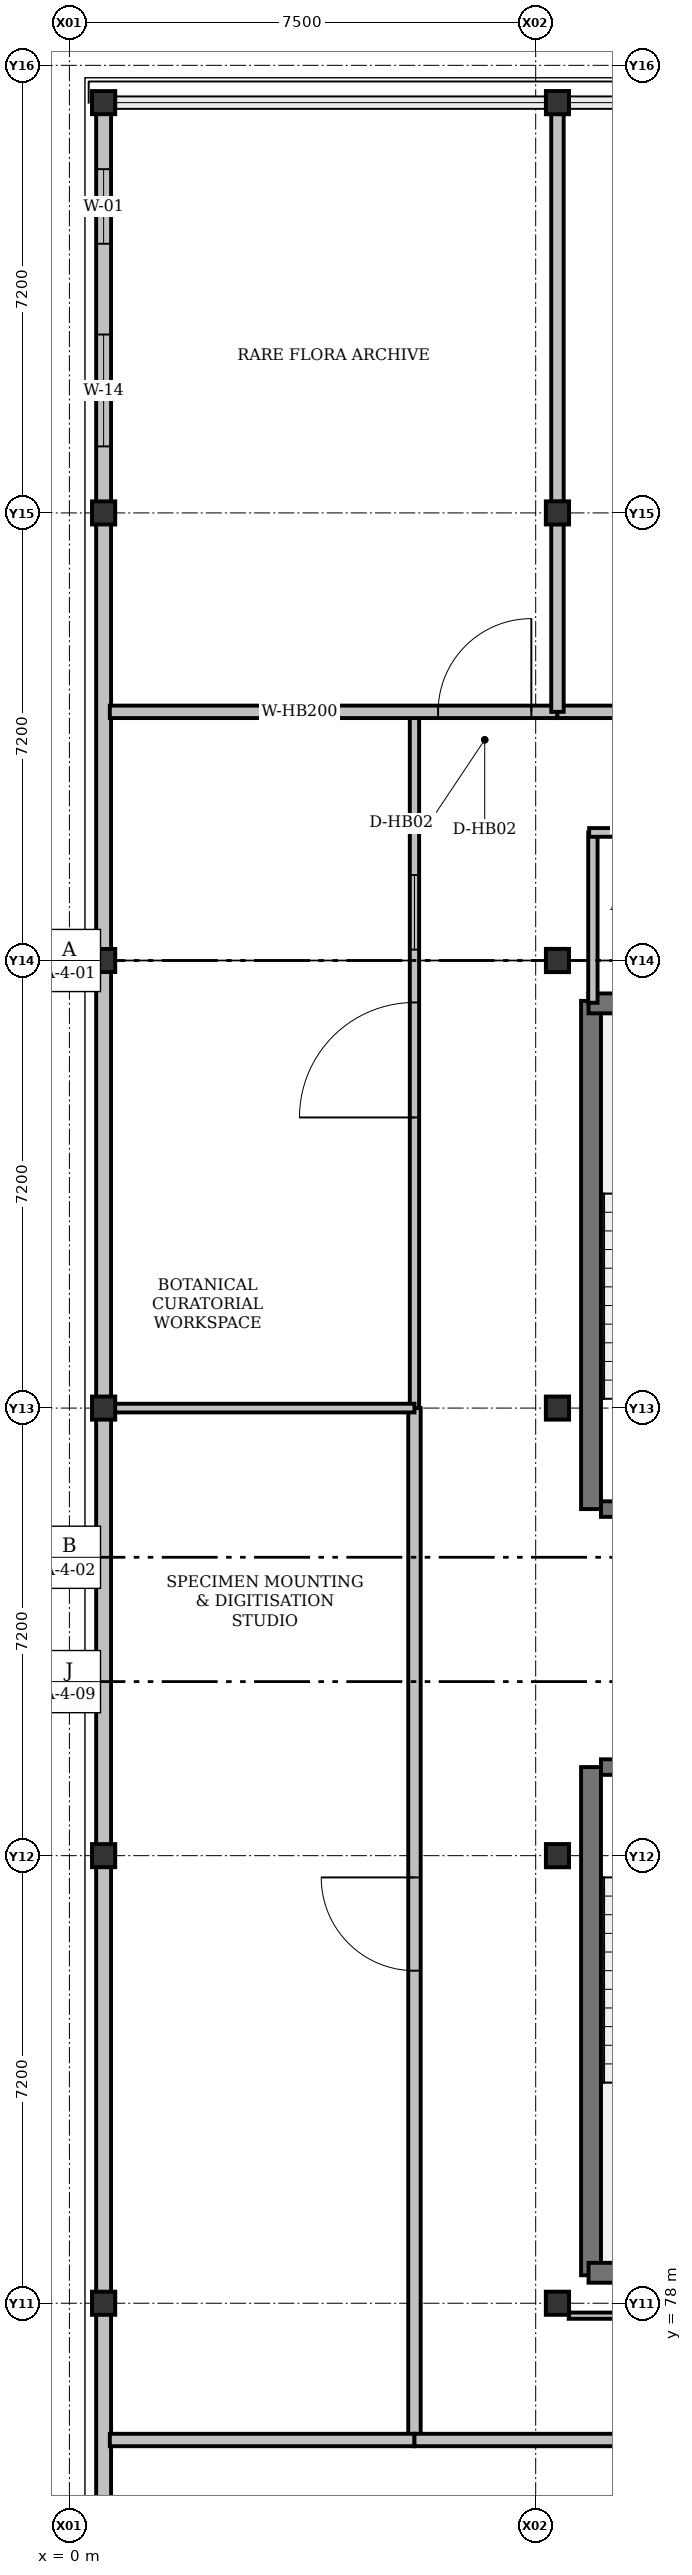
"""IFC4 building model, lengths in metres.
Left out: names, types, materials, properties, quantities, classifications, styles, units other than length and angle.
Written with IfcOpenShell. Run it as: python <this file> out.ifc"""

import sys

from ifc_helpers import new_model, si_unit, direction, frame, frame_2d, origin, origin_2d, place, context, subcontext, project, spatial, rectangle, i_section, extrude, element, fill, save


model = new_model("IFC4")
c1 = context("Model", 3, precision=1e-05, world=origin(), true_north=direction((0.0, 1.0)))
c2 = subcontext(c1, "Body", "Model", "MODEL_VIEW")
j1 = project(units=[si_unit("LENGTHUNIT", "METRE"), si_unit("PLANEANGLEUNIT", "RADIAN")], contexts=[c1])
p1 = place(None, origin())
s1 = spatial("IfcSite", under=j1, at=p1, CompositionType="ELEMENT")
p2 = place(p1, origin())
s2 = spatial("IfcBuilding", under=s1, at=p2, CompositionType="ELEMENT")
p3 = place(p2, frame((0.0, 0.0, 30.9)))
s3 = spatial("IfcBuildingStorey", under=s2, at=p3, CompositionType="ELEMENT", Elevation=30.9)
for number, where, z_axis, x_axis in (
    (1, (0.55, 78.0, 0.0), (0.0, 0.0, 1.0), (1.0, 0.0, 0.0)),
    (2, (7.85, 78.0, 0.0), (0.0, 0.0, 1.0), (1.0, 0.0, 0.0)),
    (3, (0.55, 85.2, 0.0), (0.0, 0.0, 1.0), (1.0, 0.0, 0.0)),
    (4, (7.85, 85.2, 0.0), (0.0, 0.0, 1.0), (0.0, 1.0, 0.0)),
    (5, (0.55, 92.4, 0.0), (0.0, 0.0, 1.0), (1.0, 0.0, 0.0)),
    (6, (7.85, 92.4, 0.0), (0.0, 0.0, 1.0), (1.0, 0.0, 0.0)),
    (7, (0.55, 99.6, 0.0), (0.0, 0.0, 1.0), (1.0, 0.0, 0.0)),
    (8, (7.85, 99.6, 0.0), (0.0, 0.0, 1.0), (0.0, 1.0, 0.0)),
    (9, (0.55, 106.8, 0.0), (0.0, 0.0, 1.0), (1.0, 0.0, 0.0)),
    (10, (7.85, 106.8, 0.0), (0.0, 0.0, 1.0), (1.0, 0.0, 0.0)),
    (11, (0.55, 113.4, 0.0), (0.0, 0.0, 1.0), (1.0, 0.0, 0.0)),
    (12, (7.85, 113.4, 0.0), (0.0, 0.0, 1.0), (0.0, 1.0, 0.0)),
):
    element("IfcColumn", number, at=place(p3, frame(where, z_axis=z_axis, x_axis=x_axis)), inside=s3, PredefinedType="COLUMN", context=c2, shape_type="SweptSolid", body=[
        extrude(i_section(OverallWidth=0.374, OverallDepth=0.372, WebThickness=0.016, FlangeThickness=0.026, FilletRadius=0.015, at=origin_2d()), origin(), (0.0, 0.0, 1.0), 4.2),
    ])
p4 = place(p3, frame((0.55, 70.5, 0.0), z_axis=(0.0, 0.0, 1.0), x_axis=(0.0, 1.0, 0.0)))
e13 = element("IfcWall", 13, at=p4, inside=s3, PredefinedType="SOLIDWALL", context=c2, shape_type="SweptSolid", body=[
    extrude(rectangle(XDim=7.5, YDim=0.24, at=frame_2d((3.75, 0.0))), origin(), (0.0, 0.0, 1.0), 3.562),
])
for number, where, z_axis, x_axis in (
    (14, (0.55, 78.0, 0.0), (0.0, 0.0, 1.0), (0.0, 1.0, 0.0)),
    (15, (0.55, 85.2, 0.0), (0.0, 0.0, 1.0), (0.0, 1.0, 0.0)),
):
    element("IfcWall", number, at=place(p3, frame(where, z_axis=z_axis, x_axis=x_axis)), inside=s3, PredefinedType="SOLIDWALL", context=c2, shape_type="SweptSolid", body=[
        extrude(rectangle(XDim=7.2, YDim=0.24, at=frame_2d((3.6, 0.0))), origin(), (0.0, 0.0, 1.0), 3.562),
    ])
p5 = place(p3, frame((0.55, 92.4, 0.0), z_axis=(0.0, 0.0, 1.0), x_axis=(0.0, 1.0, 0.0)))
e16 = element("IfcWall", 16, at=p5, inside=s3, PredefinedType="SOLIDWALL", context=c2, shape_type="SweptSolid", body=[
    extrude(rectangle(XDim=7.2, YDim=0.24, at=frame_2d((3.6, 0.0))), origin(), (0.0, 0.0, 1.0), 3.562),
])
p6 = place(p3, frame((0.55, 99.6, 0.0), z_axis=(0.0, 0.0, 1.0), x_axis=(0.0, 1.0, 0.0)))
e17 = element("IfcWall", 17, at=p6, inside=s3, PredefinedType="SOLIDWALL", context=c2, shape_type="SweptSolid", body=[
    extrude(rectangle(XDim=7.2, YDim=0.24, at=frame_2d((3.6, 0.0))), origin(), (0.0, 0.0, 1.0), 3.562),
])
p7 = place(p3, frame((0.55, 106.8, 0.0), z_axis=(0.0, 0.0, 1.0), x_axis=(0.0, 1.0, 0.0)))
e18 = element("IfcWall", 18, at=p7, inside=s3, PredefinedType="SOLIDWALL", context=c2, shape_type="SweptSolid", body=[
    extrude(rectangle(XDim=6.6, YDim=0.24, at=frame_2d((3.3, 0.0))), origin(), (0.0, 0.0, 1.0), 3.562),
])
p8 = place(p7, frame((1.07, 0.0, 0.92)))
e19 = element("IfcOpeningElement", 19, at=p8, cuts=e18, PredefinedType="OPENING", context=c2, shape_type="SweptSolid", body=[
    extrude(rectangle(XDim=1.8, YDim=1.7, at=frame_2d((0.9, 0.85))), frame((0.0, 0.12, 0.0), z_axis=(0.0, -1.0, 0.0), x_axis=(1.0, 0.0, 0.0)), (0.0, 0.0, 1.0), 0.24),
])
p9 = place(p7, frame((4.33, 0.0, 0.92)))
e20 = element("IfcOpeningElement", 20, at=p9, cuts=e18, PredefinedType="OPENING", context=c2, shape_type="SweptSolid", body=[
    extrude(rectangle(XDim=1.2, YDim=1.4, at=frame_2d((0.6, 0.7))), frame((0.0, 0.12, 0.0), z_axis=(0.0, -1.0, 0.0), x_axis=(1.0, 0.0, 0.0)), (0.0, 0.0, 1.0), 0.24),
])
for number, where, z_axis, x_axis in (
    (21, (8.39, 78.45, 0.0), (0.0, 0.0, 1.0), (0.0, 1.0, 0.0)),
    (22, (8.39, 90.775, 0.0), (0.0, 0.0, 1.0), (0.0, 1.0, 0.0)),
):
    element("IfcWall", number, at=place(p3, frame(where, z_axis=z_axis, x_axis=x_axis)), inside=s3, PredefinedType="SHEAR", context=c2, shape_type="SweptSolid", body=[
        extrude(rectangle(XDim=8.175, YDim=0.32, at=frame_2d((4.087, 0.0))), origin(), (0.0, 0.0, 1.0), 4.2),
    ])
for number, where, z_axis, x_axis in (
    (23, (8.35, 78.49, 0.0), (0.0, 0.0, 1.0), (1.0, 0.0, 0.0)),
    (24, (8.35, 98.91, 0.0), (0.0, 0.0, 1.0), (1.0, 0.0, 0.0)),
):
    element("IfcWall", number, at=place(p3, frame(where, z_axis=z_axis, x_axis=x_axis)), inside=s3, PredefinedType="SHEAR", context=c2, shape_type="SweptSolid", body=[
        extrude(rectangle(XDim=3.77, YDim=0.32, at=frame_2d((1.885, 0.0))), origin(), (0.0, 0.0, 1.0), 4.2),
    ])
p10 = place(p3, frame((8.55, 86.625, 0.0), z_axis=(0.0, 0.0, 1.0), x_axis=(1.0, 0.0, 0.0)))
e25 = element("IfcWall", 25, at=p10, inside=s3, PredefinedType="SHEAR", context=c2, shape_type="SweptSolid", body=[
    extrude(rectangle(XDim=3.32, YDim=0.25, at=frame_2d((1.66, 0.0))), origin(), (0.0, 0.0, 1.0), 4.2),
])
p11 = place(p10, frame((1.75, 0.0, 0.0)))
e26 = element("IfcOpeningElement", 26, at=p11, cuts=e25, PredefinedType="OPENING", context=c2, shape_type="SweptSolid", body=[
    extrude(rectangle(XDim=1.1, YDim=2.15, at=frame_2d((0.55, 1.075))), frame((0.0, 0.125, 0.0), z_axis=(0.0, -1.0, 0.0), x_axis=(1.0, 0.0, 0.0)), (0.0, 0.0, 1.0), 0.25),
])
p12 = place(p3, frame((11.87, 90.775, 0.0), z_axis=(0.0, 0.0, 1.0), x_axis=(-1.0, 0.0, 0.0)))
e27 = element("IfcWall", 27, at=p12, inside=s3, PredefinedType="SHEAR", context=c2, shape_type="SweptSolid", body=[
    extrude(rectangle(XDim=3.32, YDim=0.25, at=frame_2d((1.66, 0.0))), origin(), (0.0, 0.0, 1.0), 4.2),
])
p13 = place(p12, frame((0.45, 0.0, 0.0)))
e28 = element("IfcOpeningElement", 28, at=p13, cuts=e27, PredefinedType="OPENING", context=c2, shape_type="SweptSolid", body=[
    extrude(rectangle(XDim=1.15, YDim=2.15, at=frame_2d((0.575, 1.075))), frame((0.0, 0.125, 0.0), z_axis=(0.0, -1.0, 0.0), x_axis=(1.0, 0.0, 0.0)), (0.0, 0.0, 1.0), 0.25),
])
p14 = place(p3, frame((8.42, 98.92, 0.0), z_axis=(0.0, 0.0, 1.0), x_axis=(0.0, 1.0, 0.0)))
e29 = element("IfcWall", 29, at=p14, inside=s3, PredefinedType="PARTITIONING", context=c2, shape_type="SweptSolid", body=[
    extrude(rectangle(XDim=2.74, YDim=0.15, at=frame_2d((1.37, 0.0))), origin(), (0.0, 0.0, 1.0), 3.436),
])
p15 = place(p3, frame((8.36, 101.66, 0.0), z_axis=(0.0, 0.0, 1.0), x_axis=(1.0, 0.0, 0.0)))
e30 = element("IfcWall", 30, at=p15, inside=s3, PredefinedType="PARTITIONING", context=c2, shape_type="SweptSolid", body=[
    extrude(rectangle(XDim=3.7, YDim=0.14, at=frame_2d((1.85, 0.0))), origin(), (0.0, 0.0, 1.0), 3.95),
])
p16 = place(p3, frame((8.032, 77.8, 0.0), z_axis=(0.0, 0.0, 1.0), x_axis=(1.0, 0.0, 0.0)))
e31 = element("IfcWall", 31, at=p16, inside=s3, PredefinedType="PARTITIONING", context=c2, shape_type="SweptSolid", body=[
    extrude(rectangle(XDim=3.968, YDim=0.1, at=frame_2d((1.984, 0.0))), origin(), (0.0, 0.0, 1.0), 3.436),
])
p17 = place(p3, frame((5.55, 75.8, 0.0), z_axis=(0.0, 0.0, 1.0), x_axis=(0.0, 1.0, 0.0)))
e32 = element("IfcWall", 32, at=p17, inside=s3, PredefinedType="SOLIDWALL", context=c2, shape_type="SweptSolid", body=[
    extrude(rectangle(XDim=16.6, YDim=0.2, at=frame_2d((8.3, 0.0))), origin(), (0.0, 0.0, 1.0), 3.436),
])
p18 = place(p17, frame((7.55, 0.0, 0.0)))
e33 = element("IfcOpeningElement", 33, at=p18, cuts=e32, PredefinedType="OPENING", context=c2, shape_type="SweptSolid", body=[
    extrude(rectangle(XDim=1.5, YDim=2.3, at=frame_2d((0.75, 1.15))), frame((0.0, 0.1, 0.0), z_axis=(0.0, -1.0, 0.0), x_axis=(1.0, 0.0, 0.0)), (0.0, 0.0, 1.0), 0.2),
])
p19 = place(p3, frame((5.55, 92.4, 0.0), z_axis=(0.0, 0.0, 1.0), x_axis=(0.0, 1.0, 0.0)))
e34 = element("IfcWall", 34, at=p19, inside=s3, PredefinedType="PARTITIONING", context=c2, shape_type="SweptSolid", body=[
    extrude(rectangle(XDim=11.2, YDim=0.15, at=frame_2d((5.6, 0.0))), origin(), (0.0, 0.0, 1.0), 3.436),
])
p20 = place(p19, frame((4.675, 0.0, 0.0)))
e35 = element("IfcOpeningElement", 35, at=p20, cuts=e34, PredefinedType="OPENING", context=c2, shape_type="SweptSolid", body=[
    extrude(rectangle(XDim=1.85, YDim=2.35, at=frame_2d((0.925, 1.175))), frame((0.0, 0.075, 0.0), z_axis=(0.0, -1.0, 0.0), x_axis=(1.0, 0.0, 0.0)), (0.0, 0.0, 1.0), 0.15),
])
p21 = place(p19, frame((7.375, 0.0, 0.92)))
e36 = element("IfcOpeningElement", 36, at=p21, cuts=e34, PredefinedType="OPENING", context=c2, shape_type="SweptSolid", body=[
    extrude(rectangle(XDim=1.2, YDim=1.2, at=frame_2d((0.6, 0.6))), frame((0.0, 0.075, 0.0), z_axis=(0.0, -1.0, 0.0), x_axis=(1.0, 0.0, 0.0)), (0.0, 0.0, 1.0), 0.15),
])
p22 = place(p3, frame((0.65, 92.4, 0.0), z_axis=(0.0, 0.0, 1.0), x_axis=(1.0, 0.0, 0.0)))
e37 = element("IfcWall", 37, at=p22, inside=s3, PredefinedType="PARTITIONING", context=c2, shape_type="SweptSolid", body=[
    extrude(rectangle(XDim=4.9, YDim=0.14, at=frame_2d((2.45, 0.0))), origin(), (0.0, 0.0, 1.0), 3.436),
])
p23 = place(p3, frame((0.65, 103.6, 0.0), z_axis=(0.0, 0.0, 1.0), x_axis=(1.0, 0.0, 0.0)))
e38 = element("IfcWall", 38, at=p23, inside=s3, PredefinedType="SOLIDWALL", context=c2, shape_type="SweptSolid", body=[
    extrude(rectangle(XDim=7.2, YDim=0.2, at=frame_2d((3.6, 0.0))), origin(), (0.0, 0.0, 1.0), 3.512),
])
p24 = place(p23, frame((5.28, 0.0, 0.0)))
e39 = element("IfcOpeningElement", 39, at=p24, cuts=e38, PredefinedType="OPENING", context=c2, shape_type="SweptSolid", body=[
    extrude(rectangle(XDim=1.5, YDim=2.3, at=frame_2d((0.75, 1.15))), frame((0.0, 0.1, 0.0), z_axis=(0.0, -1.0, 0.0), x_axis=(1.0, 0.0, 0.0)), (0.0, 0.0, 1.0), 0.2),
])
p25 = place(p3, frame((7.85, 103.6, 0.0), z_axis=(0.0, 0.0, 1.0), x_axis=(1.0, 0.0, 0.0)))
e40 = element("IfcWall", 40, at=p25, inside=s3, PredefinedType="SOLIDWALL", context=c2, shape_type="SweptSolid", body=[
    extrude(rectangle(XDim=19.69, YDim=0.2, at=frame_2d((9.845, 0.0))), origin(), (0.0, 0.0, 1.0), 3.512),
])
p26 = place(p25, frame((2.075, 0.0, 0.0)))
e41 = element("IfcOpeningElement", 41, at=p26, cuts=e40, PredefinedType="OPENING", context=c2, shape_type="SweptSolid", body=[
    extrude(rectangle(XDim=1.35, YDim=2.25, at=frame_2d((0.675, 1.125))), frame((0.0, 0.1, 0.0), z_axis=(0.0, -1.0, 0.0), x_axis=(1.0, 0.0, 0.0)), (0.0, 0.0, 1.0), 0.2),
])
p27 = place(p3, frame((7.85, 106.619, 0.0), z_axis=(0.0, 0.0, 1.0), x_axis=(0.0, -1.0, 0.0)))
e42 = element("IfcWall", 42, at=p27, inside=s3, PredefinedType="SOLIDWALL", context=c2, shape_type="SweptSolid", body=[
    extrude(rectangle(XDim=3.019, YDim=0.2, at=frame_2d((1.509, 0.0))), origin(), (0.0, 0.0, 1.0), 3.512),
])
p28 = place(p3, frame((7.85, 113.35, 0.0), z_axis=(0.0, 0.0, 1.0), x_axis=(0.0, -1.0, 0.0)))
e43 = element("IfcWall", 43, at=p28, inside=s3, PredefinedType="SOLIDWALL", context=c2, shape_type="SweptSolid", body=[
    extrude(rectangle(XDim=6.369, YDim=0.2, at=frame_2d((3.185, 0.0))), origin(), (0.0, 0.0, 1.0), 3.512),
])
p29 = place(p3, frame((0.65, 75.8, 0.0), z_axis=(0.0, 0.0, 1.0), x_axis=(1.0, 0.0, 0.0)))
e44 = element("IfcWall", 44, at=p29, inside=s3, PredefinedType="SOLIDWALL", context=c2, shape_type="SweptSolid", body=[
    extrude(rectangle(XDim=4.9, YDim=0.2, at=frame_2d((2.45, 0.0))), origin(), (0.0, 0.0, 1.0), 3.95),
])
p30 = place(p3, frame((19.75, 75.8, 0.0), z_axis=(0.0, 0.0, 1.0), x_axis=(-1.0, 0.0, 0.0)))
e45 = element("IfcWall", 45, at=p30, inside=s3, PredefinedType="SOLIDWALL", context=c2, shape_type="SweptSolid", body=[
    extrude(rectangle(XDim=14.2, YDim=0.2, at=frame_2d((7.1, 0.0))), origin(), (0.0, 0.0, 1.0), 3.512),
])
p31 = place(p30, frame((7.875, 0.0, 0.0)))
e46 = element("IfcOpeningElement", 46, at=p31, cuts=e45, PredefinedType="OPENING", context=c2, shape_type="SweptSolid", body=[
    extrude(rectangle(XDim=1.35, YDim=2.25, at=frame_2d((0.675, 1.125))), frame((0.0, 0.1, 0.0), z_axis=(0.0, -1.0, 0.0), x_axis=(1.0, 0.0, 0.0)), (0.0, 0.0, 1.0), 0.2),
])
p32 = place(p8, origin())
e47 = element("IfcWindow", 47, at=p32, inside=s3, PartitioningType="DOUBLE_PANEL_VERTICAL", PredefinedType="WINDOW", context=c2, shape_type="SweptSolid", body=[
    extrude(rectangle(XDim=1.8, YDim=1.7, at=frame_2d((0.9, 0.85))), frame((0.0, 0.03, 0.0), z_axis=(0.0, -1.0, 0.0), x_axis=(1.0, 0.0, 0.0)), (0.0, 0.0, 1.0), 0.06),
])
fill(e19, e47)
p33 = place(p9, origin())
e48 = element("IfcWindow", 48, at=p33, inside=s3, PartitioningType="SINGLE_PANEL", PredefinedType="WINDOW", context=c2, shape_type="SweptSolid", body=[
    extrude(rectangle(XDim=1.2, YDim=1.4, at=frame_2d((0.6, 0.7))), frame((0.0, 0.03, 0.0), z_axis=(0.0, -1.0, 0.0), x_axis=(1.0, 0.0, 0.0)), (0.0, 0.0, 1.0), 0.06),
])
fill(e20, e48)
p34 = place(p18, origin())
e49 = element("IfcDoor", 49, at=p34, inside=s3, OperationType="SINGLE_SWING_RIGHT", PredefinedType="DOOR", context=c2, shape_type="SweptSolid", body=[
    extrude(rectangle(XDim=1.5, YDim=2.3, at=frame_2d((0.75, 1.15))), frame((0.0, 0.025, 0.0), z_axis=(0.0, -1.0, 0.0), x_axis=(1.0, 0.0, 0.0)), (0.0, 0.0, 1.0), 0.05),
])
fill(e33, e49)
p35 = place(p20, origin())
e50 = element("IfcDoor", 50, at=p35, inside=s3, OperationType="SINGLE_SWING_LEFT", PredefinedType="DOOR", context=c2, shape_type="SweptSolid", body=[
    extrude(rectangle(XDim=1.85, YDim=2.35, at=frame_2d((0.925, 1.175))), frame((0.0, 0.025, 0.0), z_axis=(0.0, -1.0, 0.0), x_axis=(1.0, 0.0, 0.0)), (0.0, 0.0, 1.0), 0.05),
])
fill(e35, e50)
p36 = place(p21, origin())
e51 = element("IfcWindow", 51, at=p36, inside=s3, PartitioningType="SINGLE_PANEL", PredefinedType="WINDOW", context=c2, shape_type="SweptSolid", body=[
    extrude(rectangle(XDim=1.2, YDim=1.2, at=frame_2d((0.6, 0.6))), frame((0.0, 0.03, 0.0), z_axis=(0.0, -1.0, 0.0), x_axis=(1.0, 0.0, 0.0)), (0.0, 0.0, 1.0), 0.06),
])
fill(e36, e51)
p37 = place(p24, origin())
e52 = element("IfcDoor", 52, at=p37, inside=s3, OperationType="SINGLE_SWING_RIGHT", PredefinedType="DOOR", context=c2, shape_type="SweptSolid", body=[
    extrude(rectangle(XDim=1.5, YDim=2.3, at=frame_2d((0.75, 1.15))), frame((0.0, 0.025, 0.0), z_axis=(0.0, -1.0, 0.0), x_axis=(1.0, 0.0, 0.0)), (0.0, 0.0, 1.0), 0.05),
])
fill(e39, e52)
save(model, sys.argv[1])
